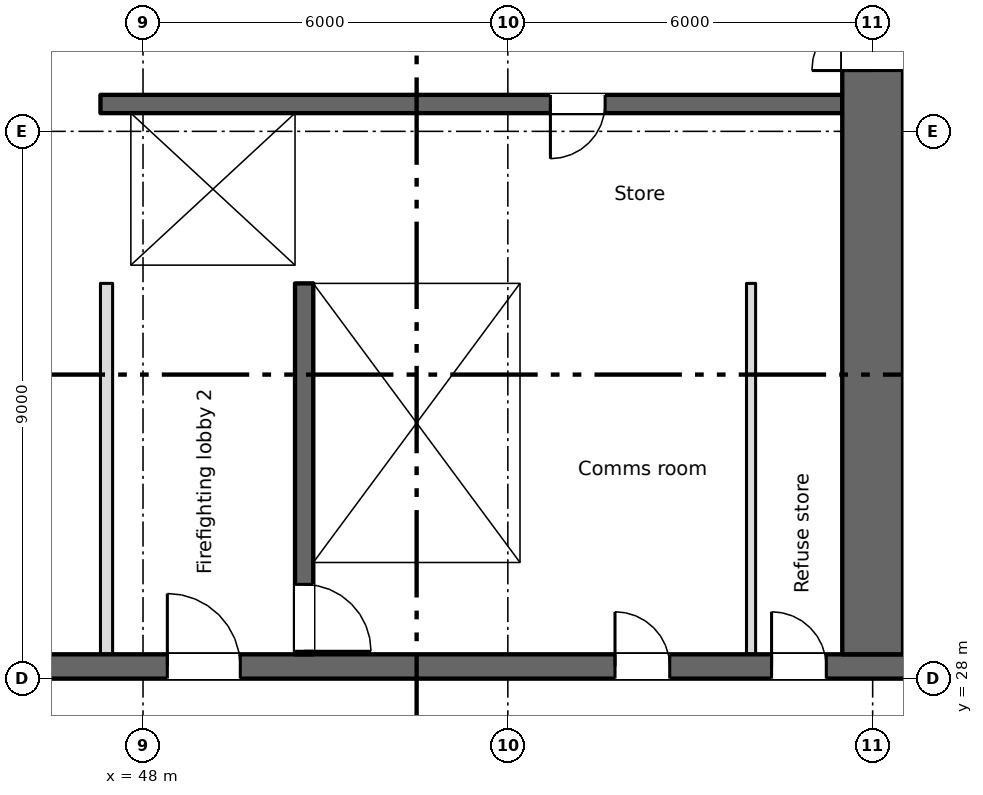
"""IFC4 building model, lengths in metres.
Left out: names, types, materials, properties, quantities, classifications, styles, units other than length and angle.
Written with IfcOpenShell. Run it as: python <this file> out.ifc"""

import sys

from ifc_helpers import new_model, si_unit, direction, frame, frame_2d, origin, place, context, subcontext, project, spatial, rectangle, extrude, element, fill, save


model = new_model("IFC4")
c1 = context("Model", 3, precision=1e-05, world=origin(), true_north=direction((0.0, 1.0)))
c2 = subcontext(c1, "Body", "Model", "MODEL_VIEW")
j1 = project(units=[si_unit("LENGTHUNIT", "METRE"), si_unit("PLANEANGLEUNIT", "RADIAN")], contexts=[c1])
p1 = place(None, origin())
s1 = spatial("IfcSite", under=j1, at=p1, CompositionType="ELEMENT")
p2 = place(p1, origin())
s2 = spatial("IfcBuilding", under=s1, at=p2, CompositionType="ELEMENT")
p3 = place(p2, frame((0.0, 0.0, 78.75)))
s3 = spatial("IfcBuildingStorey", under=s2, at=p3, CompositionType="ELEMENT", Elevation=78.75)
p4 = place(p3, frame((6.7, 28.2, 0.0), z_axis=(0.0, 0.0, 1.0), x_axis=(1.0, 0.0, 0.0)))
e1 = element("IfcWall", 1, at=p4, inside=s3, PredefinedType="SHEAR", context=c2, shape_type="SweptSolid", body=[
    extrude(rectangle(XDim=57.8, YDim=0.4, at=frame_2d((28.9, 0.0))), origin(), (0.0, 0.0, 1.0), 3.35),
])
p5 = place(p4, frame((12.062, 0.0, 0.0)))
e2 = element("IfcOpeningElement", 2, at=p5, cuts=e1, PredefinedType="OPENING", context=c2, shape_type="SweptSolid", body=[
    extrude(rectangle(XDim=0.9, YDim=2.1, at=frame_2d((0.45, 1.05))), frame((0.0, 0.21, 0.0), z_axis=(0.0, -1.0, 0.0), x_axis=(1.0, 0.0, 0.0)), (0.0, 0.0, 1.0), 0.42),
])
p6 = place(p4, frame((14.637, 0.0, 0.0)))
e3 = element("IfcOpeningElement", 3, at=p6, cuts=e1, PredefinedType="OPENING", context=c2, shape_type="SweptSolid", body=[
    extrude(rectangle(XDim=0.9, YDim=2.1, at=frame_2d((0.45, 1.05))), frame((0.0, 0.21, 0.0), z_axis=(0.0, -1.0, 0.0), x_axis=(1.0, 0.0, 0.0)), (0.0, 0.0, 1.0), 0.42),
])
p7 = place(p4, frame((49.062, 0.0, 0.0)))
e4 = element("IfcOpeningElement", 4, at=p7, cuts=e1, PredefinedType="OPENING", context=c2, shape_type="SweptSolid", body=[
    extrude(rectangle(XDim=0.9, YDim=2.1, at=frame_2d((0.45, 1.05))), frame((0.0, 0.21, 0.0), z_axis=(0.0, -1.0, 0.0), x_axis=(1.0, 0.0, 0.0)), (0.0, 0.0, 1.0), 0.42),
])
p8 = place(p4, frame((51.637, 0.0, 0.0)))
e5 = element("IfcOpeningElement", 5, at=p8, cuts=e1, PredefinedType="OPENING", context=c2, shape_type="SweptSolid", body=[
    extrude(rectangle(XDim=0.9, YDim=2.1, at=frame_2d((0.45, 1.05))), frame((0.0, 0.21, 0.0), z_axis=(0.0, -1.0, 0.0), x_axis=(1.0, 0.0, 0.0)), (0.0, 0.0, 1.0), 0.42),
])
p9 = place(p4, frame((1.35, 0.0, 0.0)))
e6 = element("IfcOpeningElement", 6, at=p9, cuts=e1, PredefinedType="OPENING", context=c2, shape_type="SweptSolid", body=[
    extrude(rectangle(XDim=0.9, YDim=2.1, at=frame_2d((0.45, 1.05))), frame((0.0, 0.21, 0.0), z_axis=(0.0, -1.0, 0.0), x_axis=(1.0, 0.0, 0.0)), (0.0, 0.0, 1.0), 0.42),
])
p10 = place(p4, frame((4.7, 0.0, 0.0)))
e7 = element("IfcOpeningElement", 7, at=p10, cuts=e1, PredefinedType="OPENING", context=c2, shape_type="SweptSolid", body=[
    extrude(rectangle(XDim=1.2, YDim=2.1, at=frame_2d((0.6, 1.05))), frame((0.0, 0.21, 0.0), z_axis=(0.0, -1.0, 0.0), x_axis=(1.0, 0.0, 0.0)), (0.0, 0.0, 1.0), 0.42),
])
p11 = place(p4, frame((31.7, 0.0, 0.0)))
e8 = element("IfcOpeningElement", 8, at=p11, cuts=e1, PredefinedType="OPENING", context=c2, shape_type="SweptSolid", body=[
    extrude(rectangle(XDim=1.2, YDim=2.1, at=frame_2d((0.6, 1.05))), frame((0.0, 0.21, 0.0), z_axis=(0.0, -1.0, 0.0), x_axis=(1.0, 0.0, 0.0)), (0.0, 0.0, 1.0), 0.42),
])
p12 = place(p4, frame((55.2, 0.0, 0.0)))
e9 = element("IfcOpeningElement", 9, at=p12, cuts=e1, PredefinedType="OPENING", context=c2, shape_type="SweptSolid", body=[
    extrude(rectangle(XDim=1.2, YDim=2.1, at=frame_2d((0.6, 1.05))), frame((0.0, 0.21, 0.0), z_axis=(0.0, -1.0, 0.0), x_axis=(1.0, 0.0, 0.0)), (0.0, 0.0, 1.0), 0.42),
])
p13 = place(p4, frame((21.7, 0.0, 0.0)))
e10 = element("IfcOpeningElement", 10, at=p13, cuts=e1, PredefinedType="OPENING", context=c2, shape_type="SweptSolid", body=[
    extrude(rectangle(XDim=1.2, YDim=2.1, at=frame_2d((0.6, 1.05))), frame((0.0, 0.21, 0.0), z_axis=(0.0, -1.0, 0.0), x_axis=(1.0, 0.0, 0.0)), (0.0, 0.0, 1.0), 0.42),
])
p14 = place(p4, frame((41.7, 0.0, 0.0)))
e11 = element("IfcOpeningElement", 11, at=p14, cuts=e1, PredefinedType="OPENING", context=c2, shape_type="SweptSolid", body=[
    extrude(rectangle(XDim=1.2, YDim=2.1, at=frame_2d((0.6, 1.05))), frame((0.0, 0.21, 0.0), z_axis=(0.0, -1.0, 0.0), x_axis=(1.0, 0.0, 0.0)), (0.0, 0.0, 1.0), 0.42),
])
p15 = place(p4, frame((24.85, 0.0, 0.0)))
e12 = element("IfcOpeningElement", 12, at=p15, cuts=e1, PredefinedType="OPENING", context=c2, shape_type="SweptSolid", body=[
    extrude(rectangle(XDim=2.4, YDim=2.1, at=frame_2d((1.2, 1.05))), frame((0.0, 0.21, 0.0), z_axis=(0.0, -1.0, 0.0), x_axis=(1.0, 0.0, 0.0)), (0.0, 0.0, 1.0), 0.42),
])
p16 = place(p4, frame((37.35, 0.0, 0.0)))
e13 = element("IfcOpeningElement", 13, at=p16, cuts=e1, PredefinedType="OPENING", context=c2, shape_type="SweptSolid", body=[
    extrude(rectangle(XDim=2.4, YDim=2.1, at=frame_2d((1.2, 1.05))), frame((0.0, 0.21, 0.0), z_axis=(0.0, -1.0, 0.0), x_axis=(1.0, 0.0, 0.0)), (0.0, 0.0, 1.0), 0.42),
])
p17 = place(p4, frame((7.85, 0.0, 0.0)))
e14 = element("IfcOpeningElement", 14, at=p17, cuts=e1, PredefinedType="OPENING", context=c2, shape_type="SweptSolid", body=[
    extrude(rectangle(XDim=2.4, YDim=2.1, at=frame_2d((1.2, 1.05))), frame((0.0, 0.21, 0.0), z_axis=(0.0, -1.0, 0.0), x_axis=(1.0, 0.0, 0.0)), (0.0, 0.0, 1.0), 0.42),
])
p18 = place(p4, frame((28.85, 0.0, 0.0)))
e15 = element("IfcOpeningElement", 15, at=p18, cuts=e1, PredefinedType="OPENING", context=c2, shape_type="SweptSolid", body=[
    extrude(rectangle(XDim=0.9, YDim=2.1, at=frame_2d((0.45, 1.05))), frame((0.0, 0.21, 0.0), z_axis=(0.0, -1.0, 0.0), x_axis=(1.0, 0.0, 0.0)), (0.0, 0.0, 1.0), 0.42),
])
p19 = place(p4, frame((34.85, 0.0, 0.0)))
e16 = element("IfcOpeningElement", 16, at=p19, cuts=e1, PredefinedType="OPENING", context=c2, shape_type="SweptSolid", body=[
    extrude(rectangle(XDim=0.9, YDim=2.1, at=frame_2d((0.45, 1.05))), frame((0.0, 0.21, 0.0), z_axis=(0.0, -1.0, 0.0), x_axis=(1.0, 0.0, 0.0)), (0.0, 0.0, 1.0), 0.42),
])
p20 = place(p3, frame((60.0, 28.4, 0.0), z_axis=(0.0, 0.0, 1.0), x_axis=(0.0, 1.0, 0.0)))
e17 = element("IfcWall", 17, at=p20, inside=s3, PredefinedType="SHEAR", context=c2, shape_type="SweptSolid", body=[
    extrude(rectangle(XDim=16.6, YDim=1.0, at=frame_2d((8.3, 0.0))), origin(), (0.0, 0.0, 1.0), 3.35),
])
p21 = place(p20, frame((9.6, 0.0, 0.0)))
e18 = element("IfcOpeningElement", 18, at=p21, cuts=e17, PredefinedType="OPENING", context=c2, shape_type="SweptSolid", body=[
    extrude(rectangle(XDim=2.0, YDim=2.1, at=frame_2d((1.0, 1.05))), frame((0.0, 0.51, 0.0), z_axis=(0.0, -1.0, 0.0), x_axis=(1.0, 0.0, 0.0)), (0.0, 0.0, 1.0), 1.02),
])
p22 = place(p20, frame((15.25, 0.0, 0.0)))
e19 = element("IfcOpeningElement", 19, at=p22, cuts=e17, PredefinedType="OPENING", context=c2, shape_type="SweptSolid", body=[
    extrude(rectangle(XDim=1.2, YDim=2.1, at=frame_2d((0.6, 1.05))), frame((0.0, 0.51, 0.0), z_axis=(0.0, -1.0, 0.0), x_axis=(1.0, 0.0, 0.0)), (0.0, 0.0, 1.0), 1.02),
])
p23 = place(p3, frame((50.65, 34.5, 0.0), z_axis=(0.0, 0.0, 1.0), x_axis=(0.0, -1.0, 0.0)))
e20 = element("IfcWall", 20, at=p23, inside=s3, PredefinedType="SHEAR", context=c2, shape_type="SweptSolid", body=[
    extrude(rectangle(XDim=6.1, YDim=0.3, at=frame_2d((3.05, 0.0))), origin(), (0.0, 0.0, 1.0), 3.35),
])
p24 = place(p23, frame((4.95, 0.0, 0.0)))
e21 = element("IfcOpeningElement", 21, at=p24, cuts=e20, PredefinedType="OPENING", context=c2, shape_type="SweptSolid", body=[
    extrude(rectangle(XDim=1.1, YDim=2.1, at=frame_2d((0.55, 1.05))), frame((0.0, 0.16, 0.0), z_axis=(0.0, -1.0, 0.0), x_axis=(1.0, 0.0, 0.0)), (0.0, 0.0, 1.0), 0.32),
])
for number, where, z_axis, x_axis in (
    (22, (54.35, 28.4, 0.0), (0.0, 0.0, 1.0), (0.0, 1.0, 0.0)),
    (23, (60.65, 28.4, 0.0), (0.0, 0.0, 1.0), (0.0, 1.0, 0.0)),
):
    element("IfcWall", number, at=place(p3, frame(where, z_axis=z_axis, x_axis=x_axis)), inside=s3, PredefinedType="SHEAR", context=c2, shape_type="SweptSolid", body=[
        extrude(rectangle(XDim=6.1, YDim=0.3, at=frame_2d((3.05, 0.0))), origin(), (0.0, 0.0, 1.0), 3.35),
    ])
p25 = place(p3, frame((47.3, 34.65, 0.0), z_axis=(0.0, 0.0, 1.0), x_axis=(1.0, 0.0, 0.0)))
e24 = element("IfcWall", 24, at=p25, inside=s3, PredefinedType="SHEAR", context=c2, shape_type="SweptSolid", body=[
    extrude(rectangle(XDim=12.2, YDim=0.3, at=frame_2d((6.1, 0.0))), origin(), (0.0, 0.0, 1.0), 3.35),
])
p26 = place(p25, frame((1.3, 0.0, 0.0)))
e25 = element("IfcOpeningElement", 25, at=p26, cuts=e24, PredefinedType="OPENING", context=c2, shape_type="SweptSolid", body=[
    extrude(rectangle(XDim=1.1, YDim=2.1, at=frame_2d((0.55, 1.05))), frame((0.0, 0.16, 0.0), z_axis=(0.0, -1.0, 0.0), x_axis=(1.0, 0.0, 0.0)), (0.0, 0.0, 1.0), 0.32),
])
p27 = place(p3, frame((59.5, 37.45, 0.0), z_axis=(0.0, 0.0, 1.0), x_axis=(-1.0, 0.0, 0.0)))
e26 = element("IfcWall", 26, at=p27, inside=s3, PredefinedType="SHEAR", context=c2, shape_type="SweptSolid", body=[
    extrude(rectangle(XDim=12.2, YDim=0.3, at=frame_2d((6.1, 0.0))), origin(), (0.0, 0.0, 1.0), 3.35),
])
p28 = place(p27, frame((3.9, 0.0, 0.0)))
e27 = element("IfcOpeningElement", 27, at=p28, cuts=e26, PredefinedType="OPENING", context=c2, shape_type="SweptSolid", body=[
    extrude(rectangle(XDim=0.9, YDim=2.1, at=frame_2d((0.45, 1.05))), frame((0.0, 0.16, 0.0), z_axis=(0.0, -1.0, 0.0), x_axis=(1.0, 0.0, 0.0)), (0.0, 0.0, 1.0), 0.32),
])
p29 = place(p3, frame((47.55, 34.8, 0.0), z_axis=(0.0, 0.0, 1.0), x_axis=(0.0, 1.0, 0.0)))
e28 = element("IfcWall", 28, at=p29, inside=s3, PredefinedType="SHEAR", context=c2, shape_type="SweptSolid", body=[
    extrude(rectangle(XDim=2.5, YDim=0.5, at=frame_2d((1.25, 0.0))), origin(), (0.0, 0.0, 1.0), 3.35),
])
p30 = place(p3, frame((50.65, 34.8, 0.0), z_axis=(0.0, 0.0, 1.0), x_axis=(0.0, 1.0, 0.0)))
e29 = element("IfcWall", 29, at=p30, inside=s3, PredefinedType="SHEAR", context=c2, shape_type="SweptSolid", body=[
    extrude(rectangle(XDim=2.5, YDim=0.3, at=frame_2d((1.25, 0.0))), origin(), (0.0, 0.0, 1.0), 3.35),
])
p31 = place(p3, frame((47.4, 28.4, 0.0), z_axis=(0.0, 0.0, 1.0), x_axis=(0.0, 1.0, 0.0)))
e30 = element("IfcWall", 30, at=p31, inside=s3, PredefinedType="PARTITIONING", context=c2, shape_type="SweptSolid", body=[
    extrude(rectangle(XDim=6.1, YDim=0.2, at=frame_2d((3.05, 0.0))), origin(), (0.0, 0.0, 1.0), 3.35),
])
p32 = place(p3, frame((58.0, 28.4, 0.0), z_axis=(0.0, 0.0, 1.0), x_axis=(0.0, 1.0, 0.0)))
e31 = element("IfcWall", 31, at=p32, inside=s3, PredefinedType="PARTITIONING", context=c2, shape_type="SweptSolid", body=[
    extrude(rectangle(XDim=6.1, YDim=0.15, at=frame_2d((3.05, 0.0))), origin(), (0.0, 0.0, 1.0), 3.35),
])
p33 = place(p7, origin())
e32 = element("IfcDoor", 32, at=p33, inside=s3, OperationType="SINGLE_SWING_LEFT", PredefinedType="DOOR", context=c2, shape_type="SweptSolid", body=[
    extrude(rectangle(XDim=0.9, YDim=2.1, at=frame_2d((0.45, 1.05))), frame((0.0, 0.025, 0.0), z_axis=(0.0, -1.0, 0.0), x_axis=(1.0, 0.0, 0.0)), (0.0, 0.0, 1.0), 0.05),
])
fill(e4, e32)
p34 = place(p8, origin())
e33 = element("IfcDoor", 33, at=p34, inside=s3, OperationType="SINGLE_SWING_LEFT", PredefinedType="DOOR", context=c2, shape_type="SweptSolid", body=[
    extrude(rectangle(XDim=0.9, YDim=2.1, at=frame_2d((0.45, 1.05))), frame((0.0, 0.025, 0.0), z_axis=(0.0, -1.0, 0.0), x_axis=(1.0, 0.0, 0.0)), (0.0, 0.0, 1.0), 0.05),
])
fill(e5, e33)
p35 = place(p28, origin())
e34 = element("IfcDoor", 34, at=p35, inside=s3, OperationType="SINGLE_SWING_RIGHT", PredefinedType="DOOR", context=c2, shape_type="SweptSolid", body=[
    extrude(rectangle(XDim=0.9, YDim=2.1, at=frame_2d((0.45, 1.05))), frame((0.0, 0.025, 0.0), z_axis=(0.0, -1.0, 0.0), x_axis=(1.0, 0.0, 0.0)), (0.0, 0.0, 1.0), 0.05),
])
fill(e27, e34)
p36 = place(p26, origin())
e35 = element("IfcDoor", 35, at=p36, inside=s3, OperationType="SLIDING_TO_LEFT", PredefinedType="DOOR", context=c2, shape_type="SweptSolid", body=[
    extrude(rectangle(XDim=1.1, YDim=2.1, at=frame_2d((0.55, 1.05))), frame((0.0, 0.025, 0.0), z_axis=(0.0, -1.0, 0.0), x_axis=(1.0, 0.0, 0.0)), (0.0, 0.0, 1.0), 0.05),
])
fill(e25, e35)
p37 = place(p24, origin())
e36 = element("IfcDoor", 36, at=p37, inside=s3, OperationType="SINGLE_SWING_RIGHT", PredefinedType="DOOR", context=c2, shape_type="SweptSolid", body=[
    extrude(rectangle(XDim=1.1, YDim=2.1, at=frame_2d((0.55, 1.05))), frame((0.0, 0.025, 0.0), z_axis=(0.0, -1.0, 0.0), x_axis=(1.0, 0.0, 0.0)), (0.0, 0.0, 1.0), 0.05),
])
fill(e21, e36)
p38 = place(p14, origin())
e37 = element("IfcDoor", 37, at=p38, inside=s3, OperationType="SINGLE_SWING_LEFT", PredefinedType="DOOR", context=c2, shape_type="SweptSolid", body=[
    extrude(rectangle(XDim=1.2, YDim=2.1, at=frame_2d((0.6, 1.05))), frame((0.0, 0.025, 0.0), z_axis=(0.0, -1.0, 0.0), x_axis=(1.0, 0.0, 0.0)), (0.0, 0.0, 1.0), 0.05),
])
fill(e11, e37)
p39 = place(p21, origin())
e38 = element("IfcDoor", 38, at=p39, inside=s3, OperationType="DOUBLE_DOOR_SINGLE_SWING", PredefinedType="DOOR", context=c2, shape_type="SweptSolid", body=[
    extrude(rectangle(XDim=2.0, YDim=2.1, at=frame_2d((1.0, 1.05))), frame((0.0, 0.025, 0.0), z_axis=(0.0, -1.0, 0.0), x_axis=(1.0, 0.0, 0.0)), (0.0, 0.0, 1.0), 0.05),
])
fill(e18, e38)
save(model, sys.argv[1])
